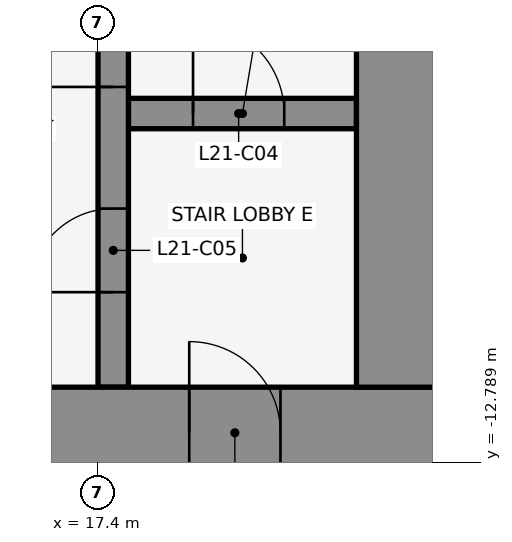
"""IFC4 building model, lengths in metres.
Left out: names, types, materials, properties, quantities, classifications, styles, units other than length and angle.
Written with IfcOpenShell. Run it as: python <this file> out.ifc"""

import sys

from ifc_helpers import new_model, si_unit, direction, frame, frame_2d, origin, place, context, subcontext, project, spatial, rectangle, extrude, element, fill, save


model = new_model("IFC4")
c1 = context("Model", 3, precision=1e-05, world=origin(), true_north=direction((0.0, 1.0)))
c2 = subcontext(c1, "Body", "Model", "MODEL_VIEW")
j1 = project(units=[si_unit("LENGTHUNIT", "METRE"), si_unit("PLANEANGLEUNIT", "RADIAN")], contexts=[c1])
p1 = place(None, origin())
s1 = spatial("IfcSite", under=j1, at=p1, CompositionType="ELEMENT")
p2 = place(p1, origin())
s2 = spatial("IfcBuilding", under=s1, at=p2, CompositionType="ELEMENT")
p3 = place(p2, frame((0.0, 0.0, 102.2)))
s3 = spatial("IfcBuildingStorey", under=s2, at=p3, CompositionType="ELEMENT", Elevation=102.2)
p4 = place(p3, frame((17.8, -8.2, 0.0), z_axis=(0.0, 0.0, 1.0), x_axis=(1.0, 0.0, 0.0)))
e1 = element("IfcWall", 1, at=p4, inside=s3, PredefinedType="SHEAR", context=c2, shape_type="SweptSolid", body=[
    extrude(rectangle(XDim=3.0, YDim=0.4, at=frame_2d((1.5, 0.0))), origin(), (0.0, 0.0, 1.0), 4.1),
])
p5 = place(p4, frame((0.85, 0.0, 0.0)))
e2 = element("IfcOpeningElement", 2, at=p5, cuts=e1, PredefinedType="OPENING", context=c2, shape_type="SweptSolid", body=[
    extrude(rectangle(XDim=1.2, YDim=2.1, at=frame_2d((0.6, 1.05))), frame((0.0, 0.212, 0.0), z_axis=(0.0, -1.0, 0.0), x_axis=(1.0, 0.0, 0.0)), (0.0, 0.0, 1.0), 0.424),
])
p6 = place(p3, frame((17.6, -11.8, 0.0), z_axis=(0.0, 0.0, 1.0), x_axis=(0.0, 1.0, 0.0)))
e3 = element("IfcWall", 3, at=p6, inside=s3, PredefinedType="SHEAR", context=c2, shape_type="SweptSolid", body=[
    extrude(rectangle(XDim=10.6, YDim=0.4, at=frame_2d((5.3, 0.0))), origin(), (0.0, 0.0, 1.0), 4.1),
])
p7 = place(p6, frame((1.25, 0.0, 0.0)))
e4 = element("IfcOpeningElement", 4, at=p7, cuts=e3, PredefinedType="OPENING", context=c2, shape_type="SweptSolid", body=[
    extrude(rectangle(XDim=1.1, YDim=2.1, at=frame_2d((0.55, 1.05))), frame((0.0, 0.212, 0.0), z_axis=(0.0, -1.0, 0.0), x_axis=(1.0, 0.0, 0.0)), (0.0, 0.0, 1.0), 0.424),
])
p8 = place(p6, frame((3.95, 0.0, 0.0)))
e5 = element("IfcOpeningElement", 5, at=p8, cuts=e3, PredefinedType="OPENING", context=c2, shape_type="SweptSolid", body=[
    extrude(rectangle(XDim=1.1, YDim=2.1, at=frame_2d((0.55, 1.05))), frame((0.0, 0.212, 0.0), z_axis=(0.0, -1.0, 0.0), x_axis=(1.0, 0.0, 0.0)), (0.0, 0.0, 1.0), 0.424),
])
p9 = place(p3, frame((-22.0, -12.4, 0.0), z_axis=(0.0, 0.0, 1.0), x_axis=(1.0, 0.0, 0.0)))
e6 = element("IfcWall", 6, at=p9, inside=s3, PredefinedType="SHEAR", context=c2, shape_type="SweptSolid", body=[
    extrude(rectangle(XDim=44.0, YDim=1.2, at=frame_2d((22.0, 0.0))), origin(), (0.0, 0.0, 1.0), 4.1),
])
p10 = place(p9, frame((2.2, 0.0, 0.0)))
e7 = element("IfcOpeningElement", 7, at=p10, cuts=e6, PredefinedType="OPENING", context=c2, shape_type="SweptSolid", body=[
    extrude(rectangle(XDim=1.2, YDim=2.1, at=frame_2d((0.6, 1.05))), frame((0.0, 0.612, 0.0), z_axis=(0.0, -1.0, 0.0), x_axis=(1.0, 0.0, 0.0)), (0.0, 0.0, 1.0), 1.224),
])
p11 = place(p9, frame((21.4, 0.0, 0.0)))
e8 = element("IfcOpeningElement", 8, at=p11, cuts=e6, PredefinedType="OPENING", context=c2, shape_type="SweptSolid", body=[
    extrude(rectangle(XDim=1.2, YDim=2.1, at=frame_2d((0.6, 1.05))), frame((0.0, 0.612, 0.0), z_axis=(0.0, -1.0, 0.0), x_axis=(1.0, 0.0, 0.0)), (0.0, 0.0, 1.0), 1.224),
])
p12 = place(p9, frame((40.6, 0.0, 0.0)))
e9 = element("IfcOpeningElement", 9, at=p12, cuts=e6, PredefinedType="OPENING", context=c2, shape_type="SweptSolid", body=[
    extrude(rectangle(XDim=1.2, YDim=2.1, at=frame_2d((0.6, 1.05))), frame((0.0, 0.612, 0.0), z_axis=(0.0, -1.0, 0.0), x_axis=(1.0, 0.0, 0.0)), (0.0, 0.0, 1.0), 1.224),
])
p13 = place(p9, frame((16.0, 0.0, 0.0)))
e10 = element("IfcOpeningElement", 10, at=p13, cuts=e6, PredefinedType="OPENING", context=c2, shape_type="SweptSolid", body=[
    extrude(rectangle(XDim=1.8, YDim=2.1, at=frame_2d((0.9, 1.05))), frame((0.0, 0.612, 0.0), z_axis=(0.0, -1.0, 0.0), x_axis=(1.0, 0.0, 0.0)), (0.0, 0.0, 1.0), 1.224),
])
p14 = place(p9, frame((6.3, 0.0, 0.0)))
e11 = element("IfcOpeningElement", 11, at=p14, cuts=e6, PredefinedType="OPENING", context=c2, shape_type="SweptSolid", body=[
    extrude(rectangle(XDim=1.2, YDim=2.1, at=frame_2d((0.6, 1.05))), frame((0.0, 0.612, 0.0), z_axis=(0.0, -1.0, 0.0), x_axis=(1.0, 0.0, 0.0)), (0.0, 0.0, 1.0), 1.224),
])
p15 = place(p9, frame((26.2, 0.0, 0.0)))
e12 = element("IfcOpeningElement", 12, at=p15, cuts=e6, PredefinedType="OPENING", context=c2, shape_type="SweptSolid", body=[
    extrude(rectangle(XDim=1.8, YDim=2.1, at=frame_2d((0.9, 1.05))), frame((0.0, 0.612, 0.0), z_axis=(0.0, -1.0, 0.0), x_axis=(1.0, 0.0, 0.0)), (0.0, 0.0, 1.0), 1.224),
])
p16 = place(p9, frame((36.5, 0.0, 0.0)))
e13 = element("IfcOpeningElement", 13, at=p16, cuts=e6, PredefinedType="OPENING", context=c2, shape_type="SweptSolid", body=[
    extrude(rectangle(XDim=1.2, YDim=2.1, at=frame_2d((0.6, 1.05))), frame((0.0, 0.612, 0.0), z_axis=(0.0, -1.0, 0.0), x_axis=(1.0, 0.0, 0.0)), (0.0, 0.0, 1.0), 1.224),
])
p17 = place(p3, frame((21.4, -11.8, 0.0), z_axis=(0.0, 0.0, 1.0), x_axis=(0.0, 1.0, 0.0)))
e14 = element("IfcWall", 14, at=p17, inside=s3, PredefinedType="SHEAR", context=c2, shape_type="SweptSolid", body=[
    extrude(rectangle(XDim=10.6, YDim=1.2, at=frame_2d((5.3, 0.0))), origin(), (0.0, 0.0, 1.0), 4.1),
])
p18 = place(p5, origin())
e15 = element("IfcDoor", 15, at=p18, inside=s3, OperationType="SINGLE_SWING_RIGHT", PredefinedType="DOOR", context=c2, shape_type="SweptSolid", body=[
    extrude(rectangle(XDim=1.2, YDim=2.1, at=frame_2d((0.6, 1.05))), frame((0.0, 0.025, 0.0), z_axis=(0.0, -1.0, 0.0), x_axis=(1.0, 0.0, 0.0)), (0.0, 0.0, 1.0), 0.05),
])
fill(e2, e15)
p19 = place(p7, origin())
e16 = element("IfcDoor", 16, at=p19, inside=s3, OperationType="SINGLE_SWING_LEFT", PredefinedType="DOOR", context=c2, shape_type="SweptSolid", body=[
    extrude(rectangle(XDim=1.1, YDim=2.1, at=frame_2d((0.55, 1.05))), frame((0.0, 0.025, 0.0), z_axis=(0.0, -1.0, 0.0), x_axis=(1.0, 0.0, 0.0)), (0.0, 0.0, 1.0), 0.05),
])
fill(e4, e16)
p20 = place(p8, origin())
e17 = element("IfcDoor", 17, at=p20, inside=s3, OperationType="SINGLE_SWING_RIGHT", PredefinedType="DOOR", context=c2, shape_type="SweptSolid", body=[
    extrude(rectangle(XDim=1.1, YDim=2.1, at=frame_2d((0.55, 1.05))), frame((0.0, 0.025, 0.0), z_axis=(0.0, -1.0, 0.0), x_axis=(1.0, 0.0, 0.0)), (0.0, 0.0, 1.0), 0.05),
])
fill(e5, e17)
p21 = place(p12, frame((1.2, 0.0, 0.0), z_axis=(0.0, 0.0, 1.0), x_axis=(-1.0, 0.0, 0.0)))
e18 = element("IfcDoor", 18, at=p21, inside=s3, OperationType="SINGLE_SWING_RIGHT", PredefinedType="DOOR", context=c2, shape_type="SweptSolid", body=[
    extrude(rectangle(XDim=1.2, YDim=2.1, at=frame_2d((0.6, 1.05))), frame((0.0, 0.025, 0.0), z_axis=(0.0, -1.0, 0.0), x_axis=(1.0, 0.0, 0.0)), (0.0, 0.0, 1.0), 0.05),
])
fill(e9, e18)
save(model, sys.argv[1])
